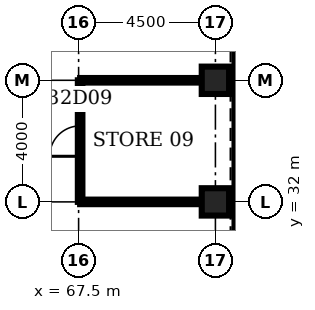
"""IFC4 building model, lengths in metres.
Left out: names, types, materials, properties, quantities, classifications, styles, units other than length and angle.
Written with IfcOpenShell. Run it as: python <this file> out.ifc"""

import sys

from ifc_helpers import new_model, si_unit, direction, frame, frame_2d, origin, origin_2d, place, context, subcontext, project, spatial, rectangle, hollow_rectangle, extrude, element, fill, save


model = new_model("IFC4")
c1 = context("Model", 3, precision=1e-05, world=origin(), true_north=direction((0.0, 1.0)))
c2 = subcontext(c1, "Body", "Model", "MODEL_VIEW")
j1 = project(units=[si_unit("LENGTHUNIT", "METRE"), si_unit("PLANEANGLEUNIT", "RADIAN")], contexts=[c1])
p1 = place(None, origin())
s1 = spatial("IfcSite", under=j1, at=p1, CompositionType="ELEMENT")
p2 = place(p1, origin())
s2 = spatial("IfcBuilding", under=s1, at=p2, CompositionType="ELEMENT")
p3 = place(p2, frame((0.0, 0.0, 146.7)))
s3 = spatial("IfcBuildingStorey", under=s2, at=p3, CompositionType="ELEMENT", Elevation=146.7)
for number, where, z_axis, x_axis in (
    (1, (72.0, 32.0, 0.0), (0.0, 0.0, 1.0), (1.0, 0.0, 0.0)),
    (2, (72.0, 36.0, 0.0), (0.0, 0.0, 1.0), (1.0, 0.0, 0.0)),
):
    element("IfcColumn", number, at=place(p3, frame(where, z_axis=z_axis, x_axis=x_axis)), inside=s3, PredefinedType="COLUMN", context=c2, shape_type="SweptSolid", body=[
        extrude(hollow_rectangle(XDim=0.9, YDim=0.9, WallThickness=0.1, at=origin_2d()), origin(), (0.0, 0.0, 1.0), 4.2),
    ])
for number, where, z_axis, x_axis in (
    (3, (67.55, 32.0, 0.0), (0.0, 0.0, 1.0), (1.0, 0.0, 0.0)),
    (4, (67.55, 36.0, 0.0), (0.0, 0.0, 1.0), (1.0, 0.0, 0.0)),
):
    element("IfcWall", number, at=place(p3, frame(where, z_axis=z_axis, x_axis=x_axis)), inside=s3, PredefinedType="PARTITIONING", context=c2, shape_type="SweptSolid", body=[
        extrude(rectangle(XDim=4.0, YDim=0.15, at=frame_2d((2.0, 0.0))), origin(), (0.0, 0.0, 1.0), 3.0),
    ])
p4 = place(p3, frame((67.55, 32.0, 0.0), z_axis=(0.0, 0.0, 1.0), x_axis=(0.0, 1.0, 0.0)))
e5 = element("IfcWall", 5, at=p4, inside=s3, PredefinedType="PARTITIONING", context=c2, shape_type="SweptSolid", body=[
    extrude(rectangle(XDim=4.0, YDim=0.15, at=frame_2d((2.0, 0.0))), origin(), (0.0, 0.0, 1.0), 3.0),
])
p5 = place(p4, frame((1.5, 0.0, 0.0)))
e6 = element("IfcOpeningElement", 6, at=p5, cuts=e5, PredefinedType="OPENING", context=c2, shape_type="SweptSolid", body=[
    extrude(rectangle(XDim=1.0, YDim=2.1, at=frame_2d((0.5, 1.05))), frame((0.0, 0.085, 0.0), z_axis=(0.0, -1.0, 0.0), x_axis=(1.0, 0.0, 0.0)), (0.0, 0.0, 1.0), 0.17),
])
p6 = place(p5, origin())
e7 = element("IfcDoor", 7, at=p6, inside=s3, OperationType="SINGLE_SWING_LEFT", PredefinedType="DOOR", context=c2, shape_type="SweptSolid", body=[
    extrude(rectangle(XDim=1.0, YDim=2.1, at=frame_2d((0.5, 1.05))), frame((0.0, 0.025, 0.0), z_axis=(0.0, -1.0, 0.0), x_axis=(1.0, 0.0, 0.0)), (0.0, 0.0, 1.0), 0.05),
])
fill(e6, e7)
save(model, sys.argv[1])
